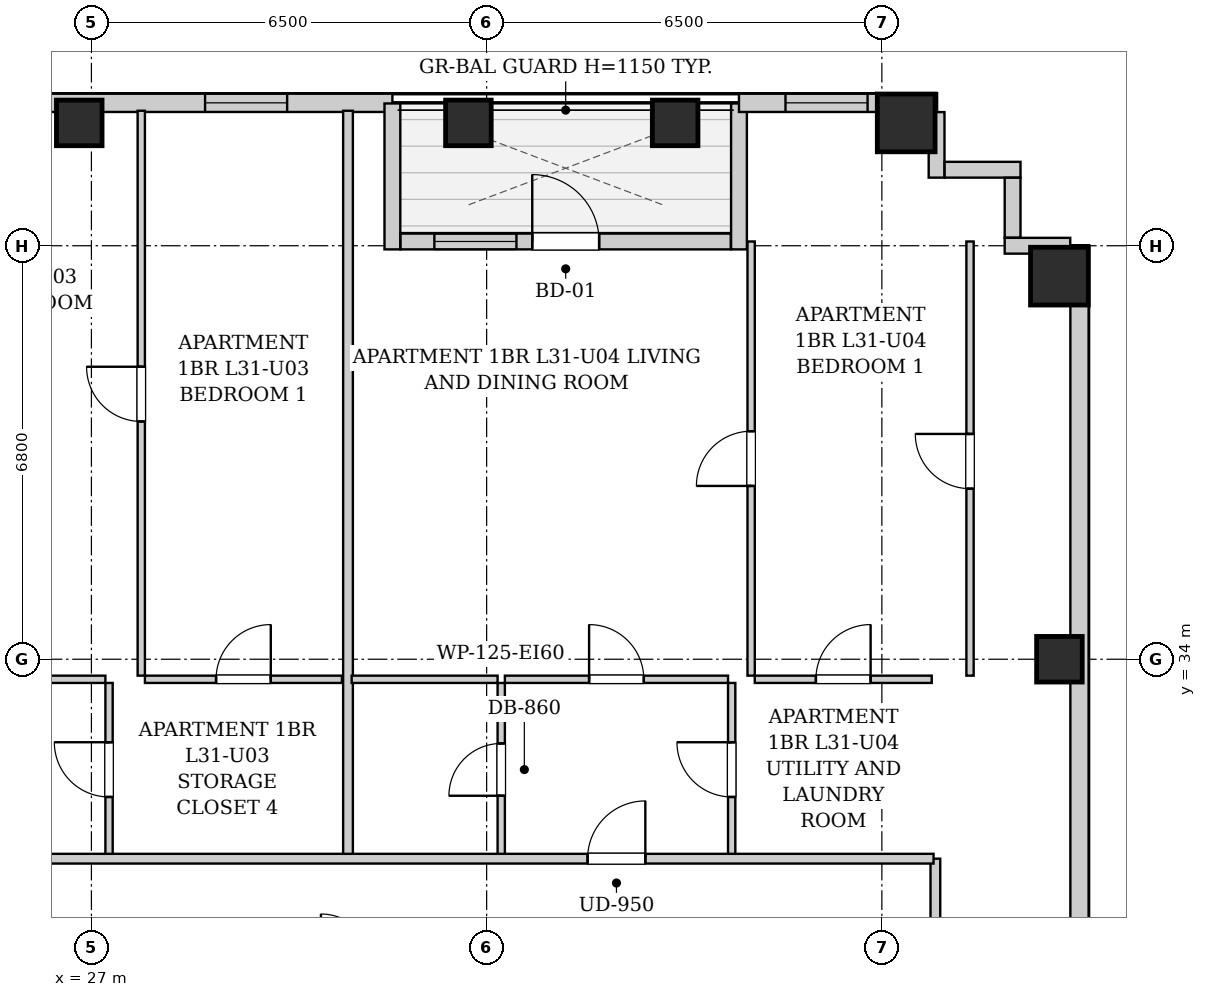
"""IFC4 building model, lengths in metres.
Left out: names, types, materials, properties, quantities, classifications, styles, units other than length and angle.
Written with IfcOpenShell. Run it as: python <this file> out.ifc"""

import sys

from ifc_helpers import new_model, si_unit, direction, frame, frame_2d, origin, origin_2d, place, context, subcontext, project, spatial, rectangle, extrude, element, fill, save


model = new_model("IFC4")
c1 = context("Model", 3, precision=1e-05, world=origin(), true_north=direction((0.0, 1.0)))
c2 = subcontext(c1, "Body", "Model", "MODEL_VIEW")
j1 = project(units=[si_unit("LENGTHUNIT", "METRE"), si_unit("PLANEANGLEUNIT", "RADIAN")], contexts=[c1])
p1 = place(None, origin())
s1 = spatial("IfcSite", under=j1, at=p1, CompositionType="ELEMENT")
p2 = place(p1, origin())
s2 = spatial("IfcBuilding", under=s1, at=p2, CompositionType="ELEMENT")
p3 = place(p2, frame((0.0, 0.0, 110.3)))
s3 = spatial("IfcBuildingStorey", under=s2, at=p3, CompositionType="ELEMENT", Elevation=110.3)
for number, where, z_axis, x_axis in (
    (1, (26.8, 42.82, 0.0), (0.0, 0.0, 1.0), (1.0, 0.0, 0.0)),
    (2, (33.2, 42.82, 0.0), (0.0, 0.0, 1.0), (1.0, 0.0, 0.0)),
    (3, (36.6, 42.82, 0.0), (0.0, 0.0, 1.0), (1.0, 0.0, 0.0)),
):
    element("IfcColumn", number, at=place(p3, frame(where, z_axis=z_axis, x_axis=x_axis)), inside=s3, PredefinedType="COLUMN", context=c2, shape_type="SweptSolid", body=[
        extrude(rectangle(XDim=0.75, YDim=0.75, at=origin_2d()), origin(), (0.0, 0.0, 1.0), 3.2),
    ])
p4 = place(p3, frame((40.4, 42.82, 0.0), z_axis=(0.0, 0.0, 1.0), x_axis=(1.0, 0.0, 0.0)))
e4 = element("IfcColumn", 4, at=p4, inside=s3, PredefinedType="COLUMN", context=c2, shape_type="SweptSolid", body=[
    extrude(rectangle(XDim=0.95, YDim=0.95, at=origin_2d()), origin(), (0.0, 0.0, 1.0), 3.2),
])
p5 = place(p3, frame((42.92, 34.0, 0.0), z_axis=(0.0, 0.0, 1.0), x_axis=(1.0, 0.0, 0.0)))
e5 = element("IfcColumn", 5, at=p5, inside=s3, PredefinedType="COLUMN", context=c2, shape_type="SweptSolid", body=[
    extrude(rectangle(XDim=0.75, YDim=0.75, at=origin_2d()), origin(), (0.0, 0.0, 1.0), 3.2),
])
p6 = place(p3, frame((42.92, 40.3, 0.0), z_axis=(0.0, 0.0, 1.0), x_axis=(1.0, 0.0, 0.0)))
e6 = element("IfcColumn", 6, at=p6, inside=s3, PredefinedType="COLUMN", context=c2, shape_type="SweptSolid", body=[
    extrude(rectangle(XDim=0.95, YDim=0.95, at=origin_2d()), origin(), (0.0, 0.0, 1.0), 3.2),
])
p7 = place(p3, frame((10.0, 43.15, 0.0), z_axis=(0.0, 0.0, 1.0), x_axis=(1.0, 0.0, 0.0)))
e7 = element("IfcWall", 7, at=p7, inside=s3, PredefinedType="SOLIDWALL", context=c2, shape_type="SweptSolid", body=[
    extrude(rectangle(XDim=21.95, YDim=0.3, at=frame_2d((10.975, 0.0))), origin(), (0.0, 0.0, 1.0), 2.94),
])
p8 = place(p7, frame((5.489, 0.0, 0.55)))
e8 = element("IfcOpeningElement", 8, at=p8, cuts=e7, PredefinedType="OPENING", context=c2, shape_type="SweptSolid", body=[
    extrude(rectangle(XDim=1.35, YDim=1.2, at=frame_2d((0.675, 0.6))), frame((0.0, 0.16, 0.0), z_axis=(0.0, -1.0, 0.0), x_axis=(1.0, 0.0, 0.0)), (0.0, 0.0, 1.0), 0.32),
])
p9 = place(p7, frame((9.322, 0.0, 0.55)))
e9 = element("IfcOpeningElement", 9, at=p9, cuts=e7, PredefinedType="OPENING", context=c2, shape_type="SweptSolid", body=[
    extrude(rectangle(XDim=1.35, YDim=1.2, at=frame_2d((0.675, 0.6))), frame((0.0, 0.16, 0.0), z_axis=(0.0, -1.0, 0.0), x_axis=(1.0, 0.0, 0.0)), (0.0, 0.0, 1.0), 0.32),
])
p10 = place(p7, frame((18.869, 0.0, 0.55)))
e10 = element("IfcOpeningElement", 10, at=p10, cuts=e7, PredefinedType="OPENING", context=c2, shape_type="SweptSolid", body=[
    extrude(rectangle(XDim=1.35, YDim=1.2, at=frame_2d((0.675, 0.6))), frame((0.0, 0.16, 0.0), z_axis=(0.0, -1.0, 0.0), x_axis=(1.0, 0.0, 0.0)), (0.0, 0.0, 1.0), 0.32),
])
p11 = place(p3, frame((31.95, 43.14, 0.0), z_axis=(0.0, 0.0, 1.0), x_axis=(0.0, -1.0, 0.0)))
e11 = element("IfcWall", 11, at=p11, inside=s3, PredefinedType="SOLIDWALL", context=c2, shape_type="SweptSolid", body=[
    extrude(rectangle(XDim=2.4, YDim=0.26, at=frame_2d((1.2, 0.0))), origin(), (0.0, 0.0, 1.0), 2.94),
])
p12 = place(p3, frame((32.084, 40.87, 0.0), z_axis=(0.0, 0.0, 1.0), x_axis=(1.0, 0.0, 0.0)))
e12 = element("IfcWall", 12, at=p12, inside=s3, PredefinedType="SOLIDWALL", context=c2, shape_type="SweptSolid", body=[
    extrude(rectangle(XDim=5.432, YDim=0.26, at=frame_2d((2.716, 0.0))), origin(), (0.0, 0.0, 1.0), 2.94),
])
p13 = place(p12, frame((2.166, 0.0, 0.0)))
e13 = element("IfcOpeningElement", 13, at=p13, cuts=e12, PredefinedType="OPENING", context=c2, shape_type="SweptSolid", body=[
    extrude(rectangle(XDim=1.1, YDim=2.0, at=frame_2d((0.55, 1.0))), frame((0.0, 0.14, 0.0), z_axis=(0.0, -1.0, 0.0), x_axis=(1.0, 0.0, 0.0)), (0.0, 0.0, 1.0), 0.28),
])
p14 = place(p12, frame((0.556, 0.0, 0.55)))
e14 = element("IfcOpeningElement", 14, at=p14, cuts=e12, PredefinedType="OPENING", context=c2, shape_type="SweptSolid", body=[
    extrude(rectangle(XDim=1.35, YDim=1.2, at=frame_2d((0.675, 0.6))), frame((0.0, 0.14, 0.0), z_axis=(0.0, -1.0, 0.0), x_axis=(1.0, 0.0, 0.0)), (0.0, 0.0, 1.0), 0.28),
])
p15 = place(p3, frame((37.65, 40.74, 0.0), z_axis=(0.0, 0.0, 1.0), x_axis=(0.0, 1.0, 0.0)))
e15 = element("IfcWall", 15, at=p15, inside=s3, PredefinedType="SOLIDWALL", context=c2, shape_type="SweptSolid", body=[
    extrude(rectangle(XDim=2.4, YDim=0.26, at=frame_2d((1.2, 0.0))), origin(), (0.0, 0.0, 1.0), 2.94),
])
p16 = place(p3, frame((37.65, 43.15, 0.0), z_axis=(0.0, 0.0, 1.0), x_axis=(1.0, 0.0, 0.0)))
e16 = element("IfcWall", 16, at=p16, inside=s3, PredefinedType="SOLIDWALL", context=c2, shape_type="SweptSolid", body=[
    extrude(rectangle(XDim=3.25, YDim=0.3, at=frame_2d((1.625, 0.0))), origin(), (0.0, 0.0, 1.0), 2.94),
])
p17 = place(p16, frame((0.765, 0.0, 0.55)))
e17 = element("IfcOpeningElement", 17, at=p17, cuts=e16, PredefinedType="OPENING", context=c2, shape_type="SweptSolid", body=[
    extrude(rectangle(XDim=1.35, YDim=1.2, at=frame_2d((0.675, 0.6))), frame((0.0, 0.16, 0.0), z_axis=(0.0, -1.0, 0.0), x_axis=(1.0, 0.0, 0.0)), (0.0, 0.0, 1.0), 0.32),
])
p18 = place(p3, frame((43.25, 40.8, 0.0), z_axis=(0.0, 0.0, 1.0), x_axis=(0.0, -1.0, 0.0)))
e18 = element("IfcWall", 18, at=p18, inside=s3, PredefinedType="SOLIDWALL", context=c2, shape_type="SweptSolid", body=[
    extrude(rectangle(XDim=12.6, YDim=0.3, at=frame_2d((6.3, 0.0))), origin(), (0.0, 0.0, 1.0), 2.94),
])
p19 = place(p3, frame((40.9, 42.998, 0.0), z_axis=(0.0, 0.0, 1.0), x_axis=(0.0, -1.0, 0.0)))
e19 = element("IfcWall", 19, at=p19, inside=s3, PredefinedType="SOLIDWALL", context=c2, shape_type="SweptSolid", body=[
    extrude(rectangle(XDim=1.078, YDim=0.26, at=frame_2d((0.539, 0.0))), origin(), (0.0, 0.0, 1.0), 2.94),
])
p20 = place(p3, frame((41.032, 42.05, 0.0), z_axis=(0.0, 0.0, 1.0), x_axis=(1.0, 0.0, 0.0)))
e20 = element("IfcWall", 20, at=p20, inside=s3, PredefinedType="SOLIDWALL", context=c2, shape_type="SweptSolid", body=[
    extrude(rectangle(XDim=1.248, YDim=0.26, at=frame_2d((0.624, 0.0))), origin(), (0.0, 0.0, 1.0), 2.94),
])
p21 = place(p3, frame((42.15, 41.918, 0.0), z_axis=(0.0, 0.0, 1.0), x_axis=(0.0, -1.0, 0.0)))
e21 = element("IfcWall", 21, at=p21, inside=s3, PredefinedType="SOLIDWALL", context=c2, shape_type="SweptSolid", body=[
    extrude(rectangle(XDim=0.986, YDim=0.26, at=frame_2d((0.493, 0.0))), origin(), (0.0, 0.0, 1.0), 2.94),
])
p22 = place(p3, frame((42.02, 40.8, 0.0), z_axis=(0.0, 0.0, 1.0), x_axis=(1.0, 0.0, 0.0)))
e22 = element("IfcWall", 22, at=p22, inside=s3, PredefinedType="SOLIDWALL", context=c2, shape_type="SweptSolid", body=[
    extrude(rectangle(XDim=1.078, YDim=0.26, at=frame_2d((0.539, 0.0))), origin(), (0.0, 0.0, 1.0), 2.94),
])
p23 = place(p3, frame((40.88, 28.98, 0.0), z_axis=(0.0, 0.0, 1.0), x_axis=(0.0, 1.0, 0.0)))
e23 = element("IfcWall", 23, at=p23, inside=s3, PredefinedType="PARTITIONING", context=c2, shape_type="SweptSolid", body=[
    extrude(rectangle(XDim=1.74, YDim=0.16, at=frame_2d((0.87, 0.0))), origin(), (0.0, 0.0, 1.0), 2.94),
])
p24 = place(p3, frame((27.29, 30.76, 0.0), z_axis=(0.0, 0.0, 1.0), x_axis=(0.0, 1.0, 0.0)))
e24 = element("IfcWall", 24, at=p24, inside=s3, PredefinedType="PARTITIONING", context=c2, shape_type="SweptSolid", body=[
    extrude(rectangle(XDim=2.85, YDim=0.12, at=frame_2d((1.425, 0.0))), origin(), (0.0, 0.0, 1.0), 2.94),
])
p25 = place(p24, frame((0.975, 0.0, 0.0)))
e25 = element("IfcOpeningElement", 25, at=p25, cuts=e24, PredefinedType="OPENING", context=c2, shape_type="SweptSolid", body=[
    extrude(rectangle(XDim=0.9, YDim=2.05, at=frame_2d((0.45, 1.025))), frame((0.0, 0.07, 0.0), z_axis=(0.0, -1.0, 0.0), x_axis=(1.0, 0.0, 0.0)), (0.0, 0.0, 1.0), 0.14),
])
p26 = place(p3, frame((23.63, 33.67, 0.0), z_axis=(0.0, 0.0, 1.0), x_axis=(1.0, 0.0, 0.0)))
e26 = element("IfcWall", 26, at=p26, inside=s3, PredefinedType="PARTITIONING", context=c2, shape_type="SweptSolid", body=[
    extrude(rectangle(XDim=3.6, YDim=0.12, at=frame_2d((1.8, 0.0))), origin(), (0.0, 0.0, 1.0), 2.94),
])
p27 = place(p26, frame((1.35, 0.0, 0.0)))
e27 = element("IfcOpeningElement", 27, at=p27, cuts=e26, PredefinedType="OPENING", context=c2, shape_type="SweptSolid", body=[
    extrude(rectangle(XDim=0.9, YDim=2.05, at=frame_2d((0.45, 1.025))), frame((0.0, 0.07, 0.0), z_axis=(0.0, -1.0, 0.0), x_axis=(1.0, 0.0, 0.0)), (0.0, 0.0, 1.0), 0.14),
])
p28 = place(p3, frame((27.88, 33.67, 0.0), z_axis=(0.0, 0.0, 1.0), x_axis=(1.0, 0.0, 0.0)))
e28 = element("IfcWall", 28, at=p28, inside=s3, PredefinedType="PARTITIONING", context=c2, shape_type="SweptSolid", body=[
    extrude(rectangle(XDim=3.24, YDim=0.12, at=frame_2d((1.62, 0.0))), origin(), (0.0, 0.0, 1.0), 2.94),
])
p29 = place(p28, frame((1.17, 0.0, 0.0)))
e29 = element("IfcOpeningElement", 29, at=p29, cuts=e28, PredefinedType="OPENING", context=c2, shape_type="SweptSolid", body=[
    extrude(rectangle(XDim=0.9, YDim=2.05, at=frame_2d((0.45, 1.025))), frame((0.0, 0.07, 0.0), z_axis=(0.0, -1.0, 0.0), x_axis=(1.0, 0.0, 0.0)), (0.0, 0.0, 1.0), 0.14),
])
p30 = place(p3, frame((27.82, 33.73, 0.0), z_axis=(0.0, 0.0, 1.0), x_axis=(0.0, 1.0, 0.0)))
e30 = element("IfcWall", 30, at=p30, inside=s3, PredefinedType="PARTITIONING", context=c2, shape_type="SweptSolid", body=[
    extrude(rectangle(XDim=9.29, YDim=0.12, at=frame_2d((4.645, 0.0))), origin(), (0.0, 0.0, 1.0), 2.94),
])
p31 = place(p30, frame((4.18, 0.0, 0.0)))
e31 = element("IfcOpeningElement", 31, at=p31, cuts=e30, PredefinedType="OPENING", context=c2, shape_type="SweptSolid", body=[
    extrude(rectangle(XDim=0.9, YDim=2.05, at=frame_2d((0.45, 1.025))), frame((0.0, 0.07, 0.0), z_axis=(0.0, -1.0, 0.0), x_axis=(1.0, 0.0, 0.0)), (0.0, 0.0, 1.0), 0.14),
])
p32 = place(p3, frame((31.22, 30.76, 0.0), z_axis=(0.0, 0.0, 1.0), x_axis=(0.0, 1.0, 0.0)))
e32 = element("IfcWall", 32, at=p32, inside=s3, PredefinedType="PARTITIONING", context=c2, shape_type="SweptSolid", body=[
    extrude(rectangle(XDim=12.26, YDim=0.16, at=frame_2d((6.13, 0.0))), origin(), (0.0, 0.0, 1.0), 2.94),
])
p33 = place(p3, frame((33.74, 30.76, 0.0), z_axis=(0.0, 0.0, 1.0), x_axis=(0.0, 1.0, 0.0)))
e33 = element("IfcWall", 33, at=p33, inside=s3, PredefinedType="PARTITIONING", context=c2, shape_type="SweptSolid", body=[
    extrude(rectangle(XDim=2.85, YDim=0.12, at=frame_2d((1.425, 0.0))), origin(), (0.0, 0.0, 1.0), 2.94),
])
p34 = place(p33, frame((0.995, 0.0, 0.0)))
e34 = element("IfcOpeningElement", 34, at=p34, cuts=e33, PredefinedType="OPENING", context=c2, shape_type="SweptSolid", body=[
    extrude(rectangle(XDim=0.86, YDim=2.05, at=frame_2d((0.43, 1.025))), frame((0.0, 0.07, 0.0), z_axis=(0.0, -1.0, 0.0), x_axis=(1.0, 0.0, 0.0)), (0.0, 0.0, 1.0), 0.14),
])
p35 = place(p3, frame((31.28, 33.67, 0.0), z_axis=(0.0, 0.0, 1.0), x_axis=(1.0, 0.0, 0.0)))
e35 = element("IfcWall", 35, at=p35, inside=s3, PredefinedType="PARTITIONING", context=c2, shape_type="SweptSolid", body=[
    extrude(rectangle(XDim=2.4, YDim=0.12, at=frame_2d((1.2, 0.0))), origin(), (0.0, 0.0, 1.0), 2.94),
])
p36 = place(p3, frame((37.53, 30.76, 0.0), z_axis=(0.0, 0.0, 1.0), x_axis=(0.0, 1.0, 0.0)))
e36 = element("IfcWall", 36, at=p36, inside=s3, PredefinedType="PARTITIONING", context=c2, shape_type="SweptSolid", body=[
    extrude(rectangle(XDim=2.85, YDim=0.12, at=frame_2d((1.425, 0.0))), origin(), (0.0, 0.0, 1.0), 2.94),
])
p37 = place(p36, frame((0.975, 0.0, 0.0)))
e37 = element("IfcOpeningElement", 37, at=p37, cuts=e36, PredefinedType="OPENING", context=c2, shape_type="SweptSolid", body=[
    extrude(rectangle(XDim=0.9, YDim=2.05, at=frame_2d((0.45, 1.025))), frame((0.0, 0.07, 0.0), z_axis=(0.0, -1.0, 0.0), x_axis=(1.0, 0.0, 0.0)), (0.0, 0.0, 1.0), 0.14),
])
p38 = place(p3, frame((33.8, 33.67, 0.0), z_axis=(0.0, 0.0, 1.0), x_axis=(1.0, 0.0, 0.0)))
e38 = element("IfcWall", 38, at=p38, inside=s3, PredefinedType="PARTITIONING", context=c2, shape_type="SweptSolid", body=[
    extrude(rectangle(XDim=3.67, YDim=0.12, at=frame_2d((1.835, 0.0))), origin(), (0.0, 0.0, 1.0), 2.94),
])
p39 = place(p38, frame((1.385, 0.0, 0.0)))
e39 = element("IfcOpeningElement", 39, at=p39, cuts=e38, PredefinedType="OPENING", context=c2, shape_type="SweptSolid", body=[
    extrude(rectangle(XDim=0.9, YDim=2.05, at=frame_2d((0.45, 1.025))), frame((0.0, 0.07, 0.0), z_axis=(0.0, -1.0, 0.0), x_axis=(1.0, 0.0, 0.0)), (0.0, 0.0, 1.0), 0.14),
])
p40 = place(p3, frame((37.91, 33.67, 0.0), z_axis=(0.0, 0.0, 1.0), x_axis=(1.0, 0.0, 0.0)))
e40 = element("IfcWall", 40, at=p40, inside=s3, PredefinedType="PARTITIONING", context=c2, shape_type="SweptSolid", body=[
    extrude(rectangle(XDim=2.91, YDim=0.12, at=frame_2d((1.455, 0.0))), origin(), (0.0, 0.0, 1.0), 2.94),
])
p41 = place(p40, frame((1.005, 0.0, 0.0)))
e41 = element("IfcOpeningElement", 41, at=p41, cuts=e40, PredefinedType="OPENING", context=c2, shape_type="SweptSolid", body=[
    extrude(rectangle(XDim=0.9, YDim=2.05, at=frame_2d((0.45, 1.025))), frame((0.0, 0.07, 0.0), z_axis=(0.0, -1.0, 0.0), x_axis=(1.0, 0.0, 0.0)), (0.0, 0.0, 1.0), 0.14),
])
p42 = place(p3, frame((37.85, 33.73, 0.0), z_axis=(0.0, 0.0, 1.0), x_axis=(0.0, 1.0, 0.0)))
e42 = element("IfcWall", 42, at=p42, inside=s3, PredefinedType="PARTITIONING", context=c2, shape_type="SweptSolid", body=[
    extrude(rectangle(XDim=7.14, YDim=0.12, at=frame_2d((3.57, 0.0))), origin(), (0.0, 0.0, 1.0), 2.94),
])
p43 = place(p42, frame((3.12, 0.0, 0.0)))
e43 = element("IfcOpeningElement", 43, at=p43, cuts=e42, PredefinedType="OPENING", context=c2, shape_type="SweptSolid", body=[
    extrude(rectangle(XDim=0.9, YDim=2.05, at=frame_2d((0.45, 1.025))), frame((0.0, 0.07, 0.0), z_axis=(0.0, -1.0, 0.0), x_axis=(1.0, 0.0, 0.0)), (0.0, 0.0, 1.0), 0.14),
])
p44 = place(p3, frame((41.45, 33.73, 0.0), z_axis=(0.0, 0.0, 1.0), x_axis=(0.0, 1.0, 0.0)))
e44 = element("IfcWall", 44, at=p44, inside=s3, PredefinedType="PARTITIONING", context=c2, shape_type="SweptSolid", body=[
    extrude(rectangle(XDim=7.14, YDim=0.12, at=frame_2d((3.57, 0.0))), origin(), (0.0, 0.0, 1.0), 2.94),
])
p45 = place(p44, frame((3.075, 0.0, 0.0)))
e45 = element("IfcOpeningElement", 45, at=p45, cuts=e44, PredefinedType="OPENING", context=c2, shape_type="SweptSolid", body=[
    extrude(rectangle(XDim=0.9, YDim=2.05, at=frame_2d((0.45, 1.025))), frame((0.0, 0.07, 0.0), z_axis=(0.0, -1.0, 0.0), x_axis=(1.0, 0.0, 0.0)), (0.0, 0.0, 1.0), 0.14),
])
p46 = place(p3, frame((10.05, 30.72, 0.0), z_axis=(0.0, 0.0, 1.0), x_axis=(1.0, 0.0, 0.0)))
e46 = element("IfcWall", 46, at=p46, inside=s3, PredefinedType="PARTITIONING", context=c2, shape_type="SweptSolid", body=[
    extrude(rectangle(XDim=30.8, YDim=0.16, at=frame_2d((15.4, 0.0))), origin(), (0.0, 0.0, 1.0), 2.94),
])
p47 = place(p46, frame((4.035, 0.0, 0.0)))
e47 = element("IfcOpeningElement", 47, at=p47, cuts=e46, PredefinedType="OPENING", context=c2, shape_type="SweptSolid", body=[
    extrude(rectangle(XDim=0.95, YDim=2.1, at=frame_2d((0.475, 1.05))), frame((0.0, 0.09, 0.0), z_axis=(0.0, -1.0, 0.0), x_axis=(1.0, 0.0, 0.0)), (0.0, 0.0, 1.0), 0.18),
])
p48 = place(p46, frame((25.11, 0.0, 0.0)))
e48 = element("IfcOpeningElement", 48, at=p48, cuts=e46, PredefinedType="OPENING", context=c2, shape_type="SweptSolid", body=[
    extrude(rectangle(XDim=0.95, YDim=2.1, at=frame_2d((0.475, 1.05))), frame((0.0, 0.09, 0.0), z_axis=(0.0, -1.0, 0.0), x_axis=(1.0, 0.0, 0.0)), (0.0, 0.0, 1.0), 0.18),
])
p49 = place(p25, origin())
e49 = element("IfcDoor", 49, at=p49, inside=s3, OperationType="SINGLE_SWING_RIGHT", PredefinedType="DOOR", context=c2, shape_type="SweptSolid", body=[
    extrude(rectangle(XDim=0.9, YDim=2.05, at=frame_2d((0.45, 1.025))), frame((0.0, 0.025, 0.0), z_axis=(0.0, -1.0, 0.0), x_axis=(1.0, 0.0, 0.0)), (0.0, 0.0, 1.0), 0.05),
])
fill(e25, e49)
p50 = place(p29, origin())
e50 = element("IfcDoor", 50, at=p50, inside=s3, OperationType="SINGLE_SWING_RIGHT", PredefinedType="DOOR", context=c2, shape_type="SweptSolid", body=[
    extrude(rectangle(XDim=0.9, YDim=2.05, at=frame_2d((0.45, 1.025))), frame((0.0, 0.025, 0.0), z_axis=(0.0, -1.0, 0.0), x_axis=(1.0, 0.0, 0.0)), (0.0, 0.0, 1.0), 0.05),
])
fill(e29, e50)
p51 = place(p31, origin())
e51 = element("IfcDoor", 51, at=p51, inside=s3, OperationType="SINGLE_SWING_RIGHT", PredefinedType="DOOR", context=c2, shape_type="SweptSolid", body=[
    extrude(rectangle(XDim=0.9, YDim=2.05, at=frame_2d((0.45, 1.025))), frame((0.0, 0.025, 0.0), z_axis=(0.0, -1.0, 0.0), x_axis=(1.0, 0.0, 0.0)), (0.0, 0.0, 1.0), 0.05),
])
fill(e31, e51)
p52 = place(p34, origin())
e52 = element("IfcDoor", 52, at=p52, inside=s3, OperationType="SINGLE_SWING_LEFT", PredefinedType="DOOR", context=c2, shape_type="SweptSolid", body=[
    extrude(rectangle(XDim=0.86, YDim=2.05, at=frame_2d((0.43, 1.025))), frame((0.0, 0.025, 0.0), z_axis=(0.0, -1.0, 0.0), x_axis=(1.0, 0.0, 0.0)), (0.0, 0.0, 1.0), 0.05),
])
fill(e34, e52)
p53 = place(p37, origin())
e53 = element("IfcDoor", 53, at=p53, inside=s3, OperationType="SINGLE_SWING_RIGHT", PredefinedType="DOOR", context=c2, shape_type="SweptSolid", body=[
    extrude(rectangle(XDim=0.9, YDim=2.05, at=frame_2d((0.45, 1.025))), frame((0.0, 0.025, 0.0), z_axis=(0.0, -1.0, 0.0), x_axis=(1.0, 0.0, 0.0)), (0.0, 0.0, 1.0), 0.05),
])
fill(e37, e53)
p54 = place(p39, origin())
e54 = element("IfcDoor", 54, at=p54, inside=s3, OperationType="SINGLE_SWING_LEFT", PredefinedType="DOOR", context=c2, shape_type="SweptSolid", body=[
    extrude(rectangle(XDim=0.9, YDim=2.05, at=frame_2d((0.45, 1.025))), frame((0.0, 0.025, 0.0), z_axis=(0.0, -1.0, 0.0), x_axis=(1.0, 0.0, 0.0)), (0.0, 0.0, 1.0), 0.05),
])
fill(e39, e54)
p55 = place(p41, origin())
e55 = element("IfcDoor", 55, at=p55, inside=s3, OperationType="SINGLE_SWING_RIGHT", PredefinedType="DOOR", context=c2, shape_type="SweptSolid", body=[
    extrude(rectangle(XDim=0.9, YDim=2.05, at=frame_2d((0.45, 1.025))), frame((0.0, 0.025, 0.0), z_axis=(0.0, -1.0, 0.0), x_axis=(1.0, 0.0, 0.0)), (0.0, 0.0, 1.0), 0.05),
])
fill(e41, e55)
p56 = place(p43, origin())
e56 = element("IfcDoor", 56, at=p56, inside=s3, OperationType="SINGLE_SWING_LEFT", PredefinedType="DOOR", context=c2, shape_type="SweptSolid", body=[
    extrude(rectangle(XDim=0.9, YDim=2.05, at=frame_2d((0.45, 1.025))), frame((0.0, 0.025, 0.0), z_axis=(0.0, -1.0, 0.0), x_axis=(1.0, 0.0, 0.0)), (0.0, 0.0, 1.0), 0.05),
])
fill(e43, e56)
p57 = place(p45, origin())
e57 = element("IfcDoor", 57, at=p57, inside=s3, OperationType="SINGLE_SWING_RIGHT", PredefinedType="DOOR", context=c2, shape_type="SweptSolid", body=[
    extrude(rectangle(XDim=0.9, YDim=2.05, at=frame_2d((0.45, 1.025))), frame((0.0, 0.025, 0.0), z_axis=(0.0, -1.0, 0.0), x_axis=(1.0, 0.0, 0.0)), (0.0, 0.0, 1.0), 0.05),
])
fill(e45, e57)
p58 = place(p48, origin())
e58 = element("IfcDoor", 58, at=p58, inside=s3, OperationType="SINGLE_SWING_RIGHT", PredefinedType="DOOR", context=c2, shape_type="SweptSolid", body=[
    extrude(rectangle(XDim=0.95, YDim=2.1, at=frame_2d((0.475, 1.05))), frame((0.0, 0.025, 0.0), z_axis=(0.0, -1.0, 0.0), x_axis=(1.0, 0.0, 0.0)), (0.0, 0.0, 1.0), 0.05),
])
fill(e48, e58)
p59 = place(p13, origin())
e59 = element("IfcDoor", 59, at=p59, inside=s3, OperationType="SINGLE_SWING_LEFT", PredefinedType="DOOR", context=c2, shape_type="SweptSolid", body=[
    extrude(rectangle(XDim=1.1, YDim=2.0, at=frame_2d((0.55, 1.0))), frame((0.0, 0.025, 0.0), z_axis=(0.0, -1.0, 0.0), x_axis=(1.0, 0.0, 0.0)), (0.0, 0.0, 1.0), 0.05),
])
fill(e13, e59)
p60 = place(p10, origin())
e60 = element("IfcWindow", 60, at=p60, inside=s3, PartitioningType="SINGLE_PANEL", PredefinedType="WINDOW", context=c2, shape_type="SweptSolid", body=[
    extrude(rectangle(XDim=1.35, YDim=1.2, at=frame_2d((0.675, 0.6))), frame((0.0, 0.03, 0.0), z_axis=(0.0, -1.0, 0.0), x_axis=(1.0, 0.0, 0.0)), (0.0, 0.0, 1.0), 0.06),
])
fill(e10, e60)
p61 = place(p14, origin())
e61 = element("IfcWindow", 61, at=p61, inside=s3, PartitioningType="SINGLE_PANEL", PredefinedType="WINDOW", context=c2, shape_type="SweptSolid", body=[
    extrude(rectangle(XDim=1.35, YDim=1.2, at=frame_2d((0.675, 0.6))), frame((0.0, 0.03, 0.0), z_axis=(0.0, -1.0, 0.0), x_axis=(1.0, 0.0, 0.0)), (0.0, 0.0, 1.0), 0.06),
])
fill(e14, e61)
p62 = place(p17, origin())
e62 = element("IfcWindow", 62, at=p62, inside=s3, PartitioningType="SINGLE_PANEL", PredefinedType="WINDOW", context=c2, shape_type="SweptSolid", body=[
    extrude(rectangle(XDim=1.35, YDim=1.2, at=frame_2d((0.675, 0.6))), frame((0.0, 0.03, 0.0), z_axis=(0.0, -1.0, 0.0), x_axis=(1.0, 0.0, 0.0)), (0.0, 0.0, 1.0), 0.06),
])
fill(e17, e62)
save(model, sys.argv[1])
